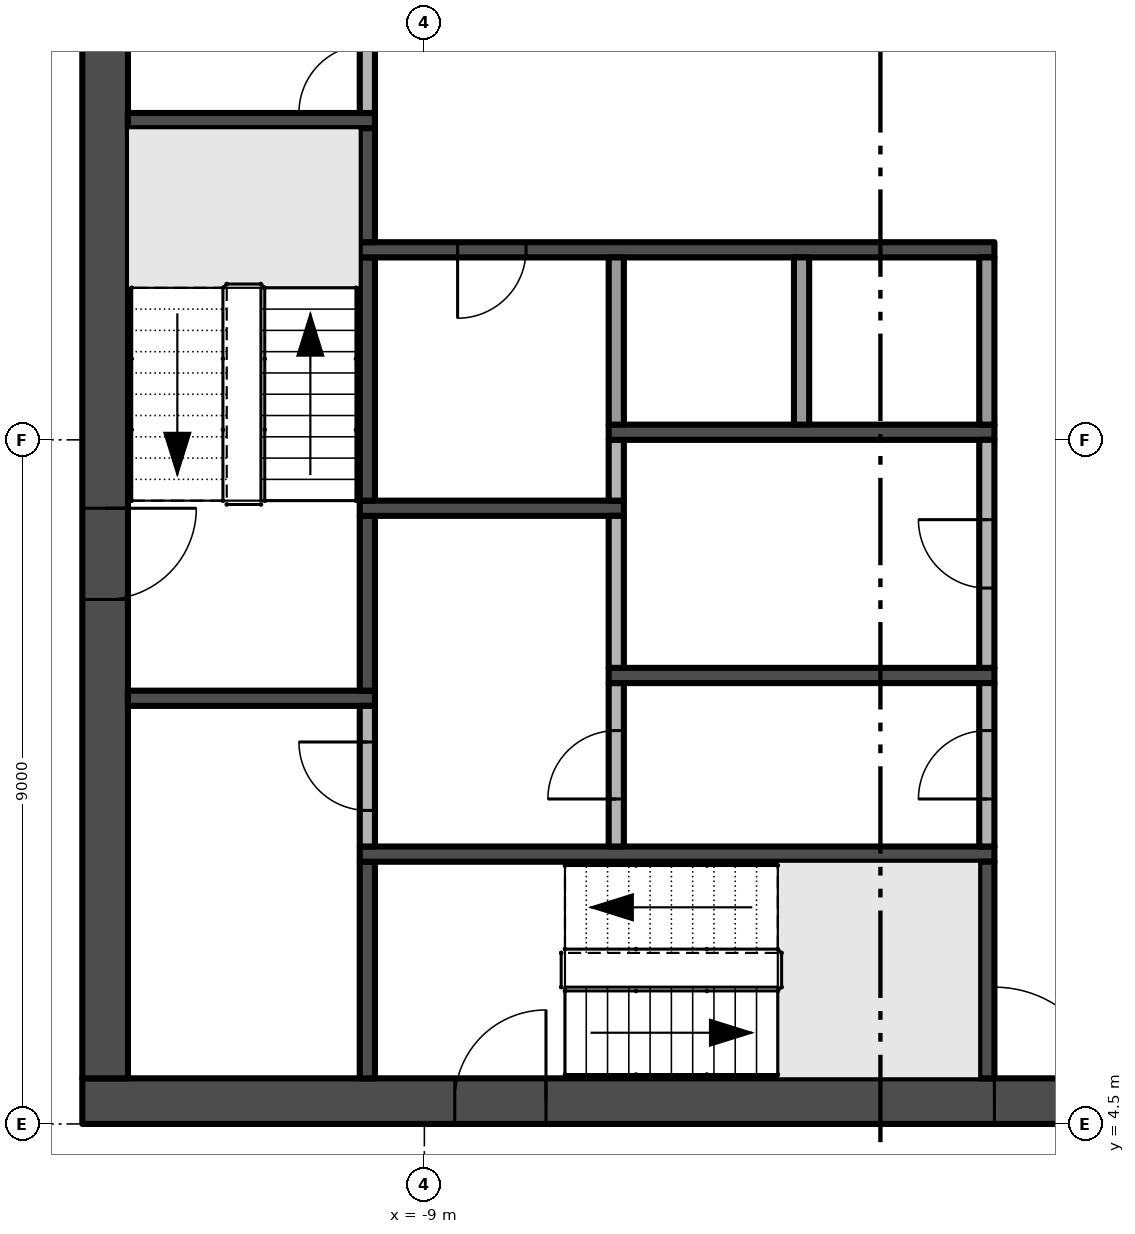
"""IFC4 building model, lengths in metres.
Left out: names, types, materials, properties, quantities, classifications, styles, units other than length and angle.
Written with IfcOpenShell. Run it as: python <this file> out.ifc"""

import sys

from ifc_helpers import new_model, si_unit, direction, frame, frame_2d, origin, place, context, subcontext, project, spatial, rectangle, extrude, element, fill, save


model = new_model("IFC4")
c1 = context("Model", 3, precision=1e-05, world=origin(), true_north=direction((0.0, 1.0)))
c2 = subcontext(c1, "Body", "Model", "MODEL_VIEW")
j1 = project(units=[si_unit("LENGTHUNIT", "METRE"), si_unit("PLANEANGLEUNIT", "RADIAN")], contexts=[c1])
p1 = place(None, origin())
s1 = spatial("IfcSite", under=j1, at=p1, CompositionType="ELEMENT")
p2 = place(p1, origin())
s2 = spatial("IfcBuilding", under=s1, at=p2, CompositionType="ELEMENT")
p3 = place(p2, frame((0.0, 0.0, 207.2)))
s3 = spatial("IfcBuildingStorey", under=s2, at=p3, CompositionType="ELEMENT", Elevation=207.2)
p4 = place(p3, frame((-13.5, 4.8, -0.3), z_axis=(0.0, 0.0, 1.0), x_axis=(1.0, 0.0, 0.0)))
e1 = element("IfcWall", 1, at=p4, inside=s3, PredefinedType="SHEAR", context=c2, shape_type="SweptSolid", body=[
    extrude(rectangle(XDim=27.0, YDim=0.6, at=frame_2d((13.5, 0.0))), origin(), (0.0, 0.0, 1.0), 3.8),
])
p5 = place(p4, frame((12.0, 0.0, 0.3)))
e2 = element("IfcOpeningElement", 2, at=p5, cuts=e1, PredefinedType="OPENING", context=c2, shape_type="SweptSolid", body=[
    extrude(rectangle(XDim=3.0, YDim=2.4, at=frame_2d((1.5, 1.2))), frame((0.0, 0.31, 0.0), z_axis=(0.0, -1.0, 0.0), x_axis=(1.0, 0.0, 0.0)), (0.0, 0.0, 1.0), 0.62),
])
p6 = place(p4, frame((4.9, 0.0, 0.3)))
e3 = element("IfcOpeningElement", 3, at=p6, cuts=e1, PredefinedType="OPENING", context=c2, shape_type="SweptSolid", body=[
    extrude(rectangle(XDim=1.2, YDim=2.2, at=frame_2d((0.6, 1.1))), frame((0.0, 0.31, 0.0), z_axis=(0.0, -1.0, 0.0), x_axis=(1.0, 0.0, 0.0)), (0.0, 0.0, 1.0), 0.62),
])
p7 = place(p4, frame((20.75, 0.0, 0.3)))
e4 = element("IfcOpeningElement", 4, at=p7, cuts=e1, PredefinedType="OPENING", context=c2, shape_type="SweptSolid", body=[
    extrude(rectangle(XDim=1.5, YDim=2.2, at=frame_2d((0.75, 1.1))), frame((0.0, 0.31, 0.0), z_axis=(0.0, -1.0, 0.0), x_axis=(1.0, 0.0, 0.0)), (0.0, 0.0, 1.0), 0.62),
])
p8 = place(p4, frame((17.4, 0.0, 0.3)))
e5 = element("IfcOpeningElement", 5, at=p8, cuts=e1, PredefinedType="OPENING", context=c2, shape_type="SweptSolid", body=[
    extrude(rectangle(XDim=1.2, YDim=2.2, at=frame_2d((0.6, 1.1))), frame((0.0, 0.31, 0.0), z_axis=(0.0, -1.0, 0.0), x_axis=(1.0, 0.0, 0.0)), (0.0, 0.0, 1.0), 0.62),
])
p9 = place(p3, frame((-13.2, 21.9, -0.3), z_axis=(0.0, 0.0, 1.0), x_axis=(0.0, -1.0, 0.0)))
e6 = element("IfcWall", 6, at=p9, inside=s3, PredefinedType="SHEAR", context=c2, shape_type="SweptSolid", body=[
    extrude(rectangle(XDim=16.8, YDim=0.6, at=frame_2d((8.4, 0.0))), origin(), (0.0, 0.0, 1.0), 3.8),
])
p10 = place(p9, frame((9.3, 0.0, 0.3)))
e7 = element("IfcOpeningElement", 7, at=p10, cuts=e6, PredefinedType="OPENING", context=c2, shape_type="SweptSolid", body=[
    extrude(rectangle(XDim=1.2, YDim=2.2, at=frame_2d((0.6, 1.1))), frame((0.0, 0.31, 0.0), z_axis=(0.0, -1.0, 0.0), x_axis=(1.0, 0.0, 0.0)), (0.0, 0.0, 1.0), 0.62),
])
for number, where, z_axis, x_axis in (
    (8, (-12.9, 10.1, 0.0), (0.0, 0.0, 1.0), (1.0, 0.0, 0.0)),
    (9, (-12.9, 17.7, 0.0), (0.0, 0.0, 1.0), (1.0, 0.0, 0.0)),
):
    element("IfcWall", number, at=place(p3, frame(where, z_axis=z_axis, x_axis=x_axis)), inside=s3, PredefinedType="SHEAR", context=c2, shape_type="SweptSolid", body=[
        extrude(rectangle(XDim=3.25, YDim=0.2, at=frame_2d((1.625, 0.0))), origin(), (0.0, 0.0, 1.0), 3.5),
    ])
p11 = place(p3, frame((-9.75, 5.1, 0.0), z_axis=(0.0, 0.0, 1.0), x_axis=(0.0, 1.0, 0.0)))
e10 = element("IfcWall", 10, at=p11, inside=s3, PredefinedType="SHEAR", context=c2, shape_type="SweptSolid", body=[
    extrude(rectangle(XDim=2.85, YDim=0.2, at=frame_2d((1.425, 0.0))), origin(), (0.0, 0.0, 1.0), 3.5),
])
p12 = place(p3, frame((-9.85, 8.05, 0.0), z_axis=(0.0, 0.0, 1.0), x_axis=(1.0, 0.0, 0.0)))
e11 = element("IfcWall", 11, at=p12, inside=s3, PredefinedType="SHEAR", context=c2, shape_type="SweptSolid", body=[
    extrude(rectangle(XDim=8.35, YDim=0.2, at=frame_2d((4.175, 0.0))), origin(), (0.0, 0.0, 1.0), 3.5),
])
p13 = place(p3, frame((-9.75, 8.15, 0.0), z_axis=(0.0, 0.0, 1.0), x_axis=(0.0, 1.0, 0.0)))
e12 = element("IfcWall", 12, at=p13, inside=s3, PredefinedType="PARTITIONING", context=c2, shape_type="SweptSolid", body=[
    extrude(rectangle(XDim=1.85, YDim=0.2, at=frame_2d((0.925, 0.0))), origin(), (0.0, 0.0, 1.0), 3.5),
])
p14 = place(p13, frame((0.475, 0.0, 0.0)))
e13 = element("IfcOpeningElement", 13, at=p14, cuts=e12, PredefinedType="OPENING", context=c2, shape_type="SweptSolid", body=[
    extrude(rectangle(XDim=0.9, YDim=2.1, at=frame_2d((0.45, 1.05))), frame((0.0, 0.11, 0.0), z_axis=(0.0, -1.0, 0.0), x_axis=(1.0, 0.0, 0.0)), (0.0, 0.0, 1.0), 0.22),
])
p15 = place(p3, frame((-9.75, 10.2, 0.0), z_axis=(0.0, 0.0, 1.0), x_axis=(0.0, 1.0, 0.0)))
e14 = element("IfcWall", 14, at=p15, inside=s3, PredefinedType="SHEAR", context=c2, shape_type="SweptSolid", body=[
    extrude(rectangle(XDim=2.3, YDim=0.2, at=frame_2d((1.15, 0.0))), origin(), (0.0, 0.0, 1.0), 3.5),
])
p16 = place(p3, frame((-9.85, 12.6, 0.0), z_axis=(0.0, 0.0, 1.0), x_axis=(1.0, 0.0, 0.0)))
e15 = element("IfcWall", 15, at=p16, inside=s3, PredefinedType="SHEAR", context=c2, shape_type="SweptSolid", body=[
    extrude(rectangle(XDim=3.475, YDim=0.2, at=frame_2d((1.738, 0.0))), origin(), (0.0, 0.0, 1.0), 3.5),
])
p17 = place(p3, frame((-9.75, 12.7, 0.0), z_axis=(0.0, 0.0, 1.0), x_axis=(0.0, 1.0, 0.0)))
e16 = element("IfcWall", 16, at=p17, inside=s3, PredefinedType="SHEAR", context=c2, shape_type="SweptSolid", body=[
    extrude(rectangle(XDim=3.2, YDim=0.2, at=frame_2d((1.6, 0.0))), origin(), (0.0, 0.0, 1.0), 3.5),
])
p18 = place(p3, frame((-1.5, 16.0, 0.0), z_axis=(0.0, 0.0, 1.0), x_axis=(-1.0, 0.0, 0.0)))
e17 = element("IfcWall", 17, at=p18, inside=s3, PredefinedType="SHEAR", context=c2, shape_type="SweptSolid", body=[
    extrude(rectangle(XDim=8.35, YDim=0.2, at=frame_2d((4.175, 0.0))), origin(), (0.0, 0.0, 1.0), 3.5),
])
p19 = place(p18, frame((6.162, 0.0, 0.0)))
e18 = element("IfcOpeningElement", 18, at=p19, cuts=e17, PredefinedType="OPENING", context=c2, shape_type="SweptSolid", body=[
    extrude(rectangle(XDim=0.9, YDim=2.1, at=frame_2d((0.45, 1.05))), frame((0.0, 0.11, 0.0), z_axis=(0.0, -1.0, 0.0), x_axis=(1.0, 0.0, 0.0)), (0.0, 0.0, 1.0), 0.22),
])
p20 = place(p3, frame((-9.75, 16.1, 0.0), z_axis=(0.0, 0.0, 1.0), x_axis=(0.0, 1.0, 0.0)))
e19 = element("IfcWall", 19, at=p20, inside=s3, PredefinedType="SHEAR", context=c2, shape_type="SweptSolid", body=[
    extrude(rectangle(XDim=1.5, YDim=0.2, at=frame_2d((0.75, 0.0))), origin(), (0.0, 0.0, 1.0), 3.5),
])
p21 = place(p3, frame((-9.75, 17.8, 0.0), z_axis=(0.0, 0.0, 1.0), x_axis=(0.0, 1.0, 0.0)))
e20 = element("IfcWall", 20, at=p21, inside=s3, PredefinedType="PARTITIONING", context=c2, shape_type="SweptSolid", body=[
    extrude(rectangle(XDim=1.4, YDim=0.2, at=frame_2d((0.7, 0.0))), origin(), (0.0, 0.0, 1.0), 3.5),
])
p22 = place(p21, origin())
e21 = element("IfcOpeningElement", 21, at=p22, cuts=e20, PredefinedType="OPENING", context=c2, shape_type="SweptSolid", body=[
    extrude(rectangle(XDim=0.9, YDim=2.1, at=frame_2d((0.45, 1.05))), frame((0.0, 0.11, 0.0), z_axis=(0.0, -1.0, 0.0), x_axis=(1.0, 0.0, 0.0)), (0.0, 0.0, 1.0), 0.22),
])
p23 = place(p3, frame((-6.475, 8.15, 0.0), z_axis=(0.0, 0.0, 1.0), x_axis=(0.0, 1.0, 0.0)))
e22 = element("IfcWall", 22, at=p23, inside=s3, PredefinedType="PARTITIONING", context=c2, shape_type="SweptSolid", body=[
    extrude(rectangle(XDim=2.15, YDim=0.2, at=frame_2d((1.075, 0.0))), origin(), (0.0, 0.0, 1.0), 3.5),
])
p24 = place(p23, frame((0.625, 0.0, 0.0)))
e23 = element("IfcOpeningElement", 23, at=p24, cuts=e22, PredefinedType="OPENING", context=c2, shape_type="SweptSolid", body=[
    extrude(rectangle(XDim=0.9, YDim=2.1, at=frame_2d((0.45, 1.05))), frame((0.0, 0.11, 0.0), z_axis=(0.0, -1.0, 0.0), x_axis=(1.0, 0.0, 0.0)), (0.0, 0.0, 1.0), 0.22),
])
p25 = place(p3, frame((-6.575, 10.4, 0.0), z_axis=(0.0, 0.0, 1.0), x_axis=(1.0, 0.0, 0.0)))
e24 = element("IfcWall", 24, at=p25, inside=s3, PredefinedType="SHEAR", context=c2, shape_type="SweptSolid", body=[
    extrude(rectangle(XDim=5.075, YDim=0.2, at=frame_2d((2.538, 0.0))), origin(), (0.0, 0.0, 1.0), 3.5),
])
p26 = place(p3, frame((-6.475, 10.5, 0.0), z_axis=(0.0, 0.0, 1.0), x_axis=(0.0, 1.0, 0.0)))
e25 = element("IfcWall", 25, at=p26, inside=s3, PredefinedType="PARTITIONING", context=c2, shape_type="SweptSolid", body=[
    extrude(rectangle(XDim=2.0, YDim=0.2, at=frame_2d((1.0, 0.0))), origin(), (0.0, 0.0, 1.0), 3.5),
])
p27 = place(p3, frame((-6.475, 12.7, 0.0), z_axis=(0.0, 0.0, 1.0), x_axis=(0.0, 1.0, 0.0)))
e26 = element("IfcWall", 26, at=p27, inside=s3, PredefinedType="PARTITIONING", context=c2, shape_type="SweptSolid", body=[
    extrude(rectangle(XDim=0.8, YDim=0.2, at=frame_2d((0.4, 0.0))), origin(), (0.0, 0.0, 1.0), 3.5),
])
p28 = place(p3, frame((-6.575, 13.6, 0.0), z_axis=(0.0, 0.0, 1.0), x_axis=(1.0, 0.0, 0.0)))
e27 = element("IfcWall", 27, at=p28, inside=s3, PredefinedType="SHEAR", context=c2, shape_type="SweptSolid", body=[
    extrude(rectangle(XDim=5.075, YDim=0.2, at=frame_2d((2.538, 0.0))), origin(), (0.0, 0.0, 1.0), 3.5),
])
for number, where, z_axis, x_axis in (
    (28, (-6.475, 13.7, 0.0), (0.0, 0.0, 1.0), (0.0, 1.0, 0.0)),
    (29, (-4.037, 13.7, 0.0), (0.0, 0.0, 1.0), (0.0, 1.0, 0.0)),
):
    element("IfcWall", number, at=place(p3, frame(where, z_axis=z_axis, x_axis=x_axis)), inside=s3, PredefinedType="PARTITIONING", context=c2, shape_type="SweptSolid", body=[
        extrude(rectangle(XDim=2.2, YDim=0.2, at=frame_2d((1.1, 0.0))), origin(), (0.0, 0.0, 1.0), 3.5),
    ])
p29 = place(p3, frame((-1.6, 5.1, 0.0), z_axis=(0.0, 0.0, 1.0), x_axis=(0.0, 1.0, 0.0)))
e30 = element("IfcWall", 30, at=p29, inside=s3, PredefinedType="SHEAR", context=c2, shape_type="SweptSolid", body=[
    extrude(rectangle(XDim=2.85, YDim=0.2, at=frame_2d((1.425, 0.0))), origin(), (0.0, 0.0, 1.0), 3.5),
])
p30 = place(p3, frame((-1.6, 8.15, 0.0), z_axis=(0.0, 0.0, 1.0), x_axis=(0.0, 1.0, 0.0)))
e31 = element("IfcWall", 31, at=p30, inside=s3, PredefinedType="PARTITIONING", context=c2, shape_type="SweptSolid", body=[
    extrude(rectangle(XDim=2.15, YDim=0.2, at=frame_2d((1.075, 0.0))), origin(), (0.0, 0.0, 1.0), 3.5),
])
p31 = place(p30, frame((0.625, 0.0, 0.0)))
e32 = element("IfcOpeningElement", 32, at=p31, cuts=e31, PredefinedType="OPENING", context=c2, shape_type="SweptSolid", body=[
    extrude(rectangle(XDim=0.9, YDim=2.1, at=frame_2d((0.45, 1.05))), frame((0.0, 0.11, 0.0), z_axis=(0.0, -1.0, 0.0), x_axis=(1.0, 0.0, 0.0)), (0.0, 0.0, 1.0), 0.22),
])
p32 = place(p3, frame((-1.6, 10.5, 0.0), z_axis=(0.0, 0.0, 1.0), x_axis=(0.0, 1.0, 0.0)))
e33 = element("IfcWall", 33, at=p32, inside=s3, PredefinedType="PARTITIONING", context=c2, shape_type="SweptSolid", body=[
    extrude(rectangle(XDim=3.0, YDim=0.2, at=frame_2d((1.5, 0.0))), origin(), (0.0, 0.0, 1.0), 3.5),
])
p33 = place(p32, frame((1.05, 0.0, 0.0)))
e34 = element("IfcOpeningElement", 34, at=p33, cuts=e33, PredefinedType="OPENING", context=c2, shape_type="SweptSolid", body=[
    extrude(rectangle(XDim=0.9, YDim=2.1, at=frame_2d((0.45, 1.05))), frame((0.0, 0.11, 0.0), z_axis=(0.0, -1.0, 0.0), x_axis=(1.0, 0.0, 0.0)), (0.0, 0.0, 1.0), 0.22),
])
p34 = place(p3, frame((-1.6, 13.7, 0.0), z_axis=(0.0, 0.0, 1.0), x_axis=(0.0, 1.0, 0.0)))
e35 = element("IfcWall", 35, at=p34, inside=s3, PredefinedType="PARTITIONING", context=c2, shape_type="SweptSolid", body=[
    extrude(rectangle(XDim=2.2, YDim=0.2, at=frame_2d((1.1, 0.0))), origin(), (0.0, 0.0, 1.0), 3.5),
])
p35 = place(p5, frame((3.0, 0.0, 0.0), z_axis=(0.0, 0.0, 1.0), x_axis=(-1.0, 0.0, 0.0)))
e36 = element("IfcDoor", 36, at=p35, inside=s3, OperationType="DOUBLE_DOOR_SINGLE_SWING", PredefinedType="DOOR", context=c2, shape_type="SweptSolid", body=[
    extrude(rectangle(XDim=3.0, YDim=2.4, at=frame_2d((1.5, 1.2))), frame((0.0, 0.025, 0.0), z_axis=(0.0, -1.0, 0.0), x_axis=(1.0, 0.0, 0.0)), (0.0, 0.0, 1.0), 0.05),
])
fill(e2, e36)
p36 = place(p10, frame((1.2, 0.0, 0.0), z_axis=(0.0, 0.0, 1.0), x_axis=(-1.0, 0.0, 0.0)))
e37 = element("IfcDoor", 37, at=p36, inside=s3, OperationType="SINGLE_SWING_RIGHT", PredefinedType="DOOR", context=c2, shape_type="SweptSolid", body=[
    extrude(rectangle(XDim=1.2, YDim=2.2, at=frame_2d((0.6, 1.1))), frame((0.0, 0.025, 0.0), z_axis=(0.0, -1.0, 0.0), x_axis=(1.0, 0.0, 0.0)), (0.0, 0.0, 1.0), 0.05),
])
fill(e7, e37)
p37 = place(p6, frame((1.2, 0.0, 0.0), z_axis=(0.0, 0.0, 1.0), x_axis=(-1.0, 0.0, 0.0)))
e38 = element("IfcDoor", 38, at=p37, inside=s3, OperationType="SINGLE_SWING_LEFT", PredefinedType="DOOR", context=c2, shape_type="SweptSolid", body=[
    extrude(rectangle(XDim=1.2, YDim=2.2, at=frame_2d((0.6, 1.1))), frame((0.0, 0.025, 0.0), z_axis=(0.0, -1.0, 0.0), x_axis=(1.0, 0.0, 0.0)), (0.0, 0.0, 1.0), 0.05),
])
fill(e3, e38)
p38 = place(p19, origin())
e39 = element("IfcDoor", 39, at=p38, inside=s3, OperationType="SINGLE_SWING_RIGHT", PredefinedType="DOOR", context=c2, shape_type="SweptSolid", body=[
    extrude(rectangle(XDim=0.9, YDim=2.1, at=frame_2d((0.45, 1.05))), frame((0.0, 0.025, 0.0), z_axis=(0.0, -1.0, 0.0), x_axis=(1.0, 0.0, 0.0)), (0.0, 0.0, 1.0), 0.05),
])
fill(e18, e39)
p39 = place(p31, origin())
e40 = element("IfcDoor", 40, at=p39, inside=s3, OperationType="SINGLE_SWING_LEFT", PredefinedType="DOOR", context=c2, shape_type="SweptSolid", body=[
    extrude(rectangle(XDim=0.9, YDim=2.1, at=frame_2d((0.45, 1.05))), frame((0.0, 0.025, 0.0), z_axis=(0.0, -1.0, 0.0), x_axis=(1.0, 0.0, 0.0)), (0.0, 0.0, 1.0), 0.05),
])
fill(e32, e40)
p40 = place(p33, origin())
e41 = element("IfcDoor", 41, at=p40, inside=s3, OperationType="SINGLE_SWING_RIGHT", PredefinedType="DOOR", context=c2, shape_type="SweptSolid", body=[
    extrude(rectangle(XDim=0.9, YDim=2.1, at=frame_2d((0.45, 1.05))), frame((0.0, 0.025, 0.0), z_axis=(0.0, -1.0, 0.0), x_axis=(1.0, 0.0, 0.0)), (0.0, 0.0, 1.0), 0.05),
])
fill(e34, e41)
p41 = place(p22, origin())
e42 = element("IfcDoor", 42, at=p41, inside=s3, OperationType="SINGLE_SWING_LEFT", PredefinedType="DOOR", context=c2, shape_type="SweptSolid", body=[
    extrude(rectangle(XDim=0.9, YDim=2.1, at=frame_2d((0.45, 1.05))), frame((0.0, 0.025, 0.0), z_axis=(0.0, -1.0, 0.0), x_axis=(1.0, 0.0, 0.0)), (0.0, 0.0, 1.0), 0.05),
])
fill(e21, e42)
p42 = place(p24, origin())
e43 = element("IfcDoor", 43, at=p42, inside=s3, OperationType="SINGLE_SWING_LEFT", PredefinedType="DOOR", context=c2, shape_type="SweptSolid", body=[
    extrude(rectangle(XDim=0.9, YDim=2.1, at=frame_2d((0.45, 1.05))), frame((0.0, 0.025, 0.0), z_axis=(0.0, -1.0, 0.0), x_axis=(1.0, 0.0, 0.0)), (0.0, 0.0, 1.0), 0.05),
])
fill(e23, e43)
p43 = place(p14, origin())
e44 = element("IfcDoor", 44, at=p43, inside=s3, OperationType="SINGLE_SWING_RIGHT", PredefinedType="DOOR", context=c2, shape_type="SweptSolid", body=[
    extrude(rectangle(XDim=0.9, YDim=2.1, at=frame_2d((0.45, 1.05))), frame((0.0, 0.025, 0.0), z_axis=(0.0, -1.0, 0.0), x_axis=(1.0, 0.0, 0.0)), (0.0, 0.0, 1.0), 0.05),
])
fill(e13, e44)
save(model, sys.argv[1])
